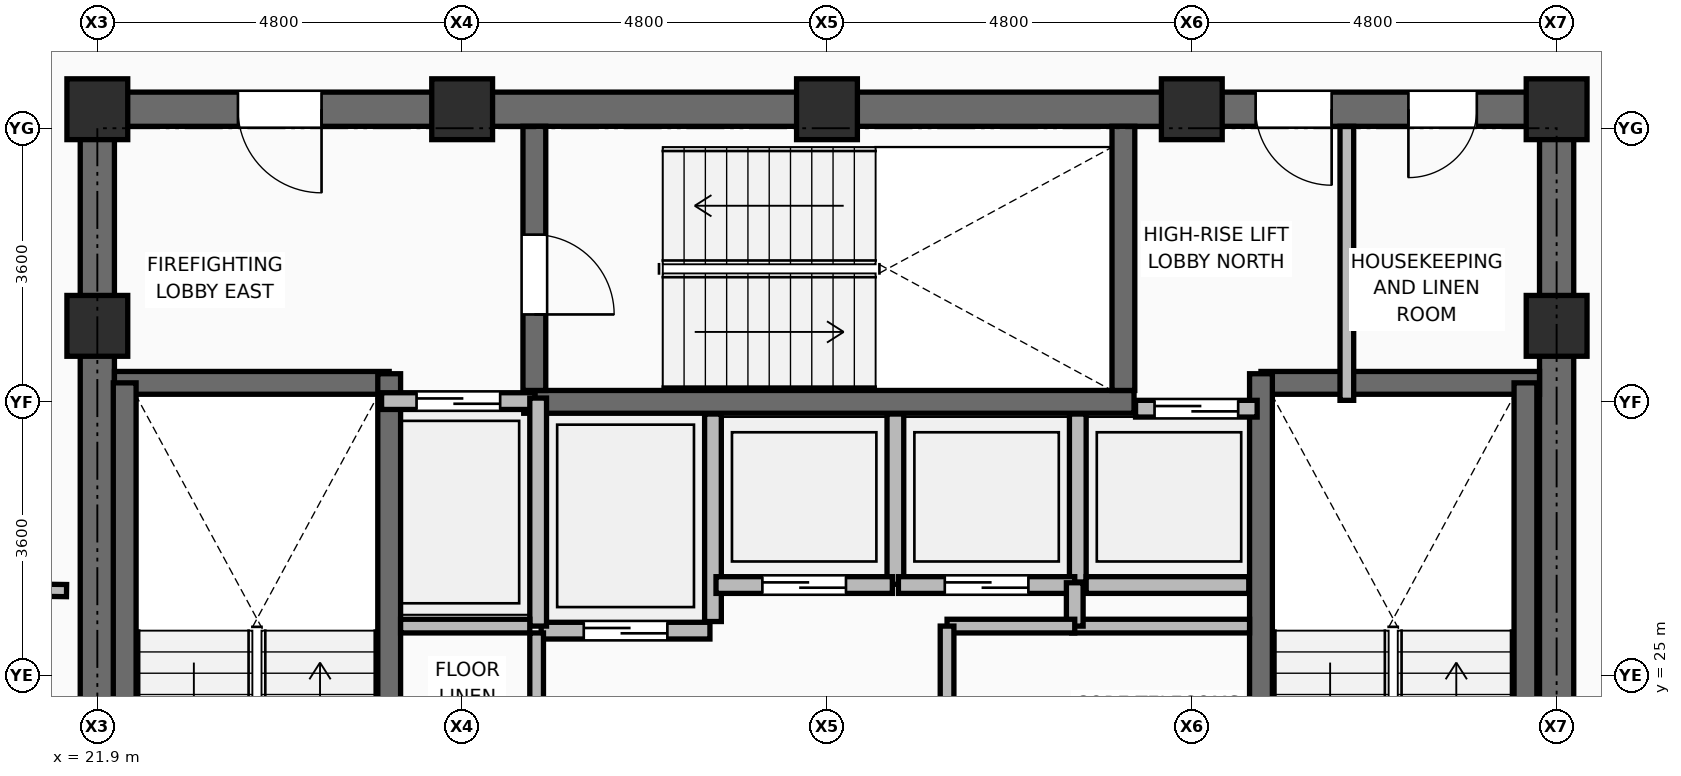
"""IFC4 building model, lengths in metres.
Left out: names, types, materials, properties, quantities, classifications, styles, units other than length and angle.
Written with IfcOpenShell. Run it as: python <this file> out.ifc"""

import sys

from ifc_helpers import new_model, si_unit, direction, frame, frame_2d, origin, origin_2d, place, context, subcontext, project, spatial, rectangle, extrude, element, fill, save


model = new_model("IFC4")
c1 = context("Model", 3, precision=1e-05, world=origin(), true_north=direction((0.0, 1.0)))
c2 = subcontext(c1, "Body", "Model", "MODEL_VIEW")
j1 = project(units=[si_unit("LENGTHUNIT", "METRE"), si_unit("PLANEANGLEUNIT", "RADIAN")], contexts=[c1])
p1 = place(None, origin())
s1 = spatial("IfcSite", under=j1, at=p1, CompositionType="ELEMENT")
p2 = place(p1, origin())
s2 = spatial("IfcBuilding", under=s1, at=p2, CompositionType="ELEMENT")
p3 = place(p2, frame((0.0, 0.0, 242.4)))
s3 = spatial("IfcBuildingStorey", under=s2, at=p3, CompositionType="ELEMENT", Elevation=242.4)
for number, where, z_axis, x_axis in (
    (1, (21.9, 29.6, 0.0), (0.0, 0.0, 1.0), (1.0, 0.0, 0.0)),
    (2, (41.1, 29.6, 0.0), (0.0, 0.0, 1.0), (1.0, 0.0, 0.0)),
    (3, (21.9, 32.45, 0.0), (0.0, 0.0, 1.0), (1.0, 0.0, 0.0)),
    (4, (26.7, 32.45, 0.0), (0.0, 0.0, 1.0), (1.0, 0.0, 0.0)),
    (5, (31.5, 32.45, 0.0), (0.0, 0.0, 1.0), (1.0, 0.0, 0.0)),
    (6, (36.3, 32.45, 0.0), (0.0, 0.0, 1.0), (1.0, 0.0, 0.0)),
    (7, (41.1, 32.45, 0.0), (0.0, 0.0, 1.0), (1.0, 0.0, 0.0)),
):
    element("IfcColumn", number, at=place(p3, frame(where, z_axis=z_axis, x_axis=x_axis)), inside=s3, PredefinedType="COLUMN", context=c2, shape_type="SweptSolid", body=[
        extrude(rectangle(XDim=0.8, YDim=0.8, at=origin_2d()), origin(), (0.0, 0.0, 1.0), 3.75),
    ])
p4 = place(p3, frame((30.0, 25.71, 0.0), z_axis=(0.0, 0.0, 1.0), x_axis=(0.0, 1.0, 0.0)))
e8 = element("IfcWall", 8, at=p4, inside=s3, PredefinedType="PARTITIONING", context=c2, shape_type="SweptSolid", body=[
    extrude(rectangle(XDim=2.73, YDim=0.22, at=frame_2d((1.365, 0.0))), origin(), (0.0, 0.0, 1.0), 3.545),
])
p5 = place(p3, frame((32.4, 26.2, 0.0), z_axis=(0.0, 0.0, 1.0), x_axis=(0.0, 1.0, 0.0)))
e9 = element("IfcWall", 9, at=p5, inside=s3, PredefinedType="PARTITIONING", context=c2, shape_type="SweptSolid", body=[
    extrude(rectangle(XDim=2.24, YDim=0.22, at=frame_2d((1.12, 0.0))), origin(), (0.0, 0.0, 1.0), 3.545),
])
p6 = place(p3, frame((34.8, 26.23, 0.0), z_axis=(0.0, 0.0, 1.0), x_axis=(0.0, 1.0, 0.0)))
e10 = element("IfcWall", 10, at=p6, inside=s3, PredefinedType="PARTITIONING", context=c2, shape_type="SweptSolid", body=[
    extrude(rectangle(XDim=2.21, YDim=0.22, at=frame_2d((1.105, 0.0))), origin(), (0.0, 0.0, 1.0), 3.545),
])
p7 = place(p3, frame((34.91, 26.19, 0.0), z_axis=(0.0, 0.0, 1.0), x_axis=(1.0, 0.0, 0.0)))
e11 = element("IfcWall", 11, at=p7, inside=s3, PredefinedType="PARTITIONING", context=c2, shape_type="SweptSolid", body=[
    extrude(rectangle(XDim=2.14, YDim=0.22, at=frame_2d((1.07, 0.0))), origin(), (0.0, 0.0, 1.0), 3.545),
])
p8 = place(p3, frame((21.675, 32.45, 0.0), z_axis=(0.0, 0.0, 1.0), x_axis=(1.0, 0.0, 0.0)))
e12 = element("IfcWall", 12, at=p8, inside=s3, PredefinedType="SHEAR", context=c2, shape_type="SweptSolid", body=[
    extrude(rectangle(XDim=19.65, YDim=0.45, at=frame_2d((9.825, 0.0))), origin(), (0.0, 0.0, 1.0), 3.57),
])
p9 = place(p8, frame((2.075, 0.0, 0.0)))
e13 = element("IfcOpeningElement", 13, at=p9, cuts=e12, PredefinedType="OPENING", context=c2, shape_type="SweptSolid", body=[
    extrude(rectangle(XDim=1.1, YDim=2.1, at=frame_2d((0.55, 1.05))), frame((0.0, 0.235, 0.0), z_axis=(0.0, -1.0, 0.0), x_axis=(1.0, 0.0, 0.0)), (0.0, 0.0, 1.0), 0.47),
])
p10 = place(p8, frame((15.465, 0.0, 0.0)))
e14 = element("IfcOpeningElement", 14, at=p10, cuts=e12, PredefinedType="OPENING", context=c2, shape_type="SweptSolid", body=[
    extrude(rectangle(XDim=1.0, YDim=2.1, at=frame_2d((0.5, 1.05))), frame((0.0, 0.235, 0.0), z_axis=(0.0, -1.0, 0.0), x_axis=(1.0, 0.0, 0.0)), (0.0, 0.0, 1.0), 0.47),
])
p11 = place(p8, frame((17.475, 0.0, 0.0)))
e15 = element("IfcOpeningElement", 15, at=p11, cuts=e12, PredefinedType="OPENING", context=c2, shape_type="SweptSolid", body=[
    extrude(rectangle(XDim=0.9, YDim=2.1, at=frame_2d((0.45, 1.05))), frame((0.0, 0.235, 0.0), z_axis=(0.0, -1.0, 0.0), x_axis=(1.0, 0.0, 0.0)), (0.0, 0.0, 1.0), 0.47),
])
p12 = place(p3, frame((21.9, 18.025, 0.0), z_axis=(0.0, 0.0, 1.0), x_axis=(0.0, 1.0, 0.0)))
e16 = element("IfcWall", 16, at=p12, inside=s3, PredefinedType="SHEAR", context=c2, shape_type="SweptSolid", body=[
    extrude(rectangle(XDim=14.2, YDim=0.45, at=frame_2d((7.1, 0.0))), origin(), (0.0, 0.0, 1.0), 3.57),
])
p13 = place(p3, frame((41.1, 18.025, 0.0), z_axis=(0.0, 0.0, 1.0), x_axis=(0.0, 1.0, 0.0)))
e17 = element("IfcWall", 17, at=p13, inside=s3, PredefinedType="SHEAR", context=c2, shape_type="SweptSolid", body=[
    extrude(rectangle(XDim=14.2, YDim=0.45, at=frame_2d((7.1, 0.0))), origin(), (0.0, 0.0, 1.0), 3.57),
])
p14 = place(p13, frame((3.435, 0.0, 0.0)))
e18 = element("IfcOpeningElement", 18, at=p14, cuts=e17, PredefinedType="OPENING", context=c2, shape_type="SweptSolid", body=[
    extrude(rectangle(XDim=1.05, YDim=2.1, at=frame_2d((0.525, 1.05))), frame((0.0, 0.235, 0.0), z_axis=(0.0, -1.0, 0.0), x_axis=(1.0, 0.0, 0.0)), (0.0, 0.0, 1.0), 0.47),
])
p15 = place(p3, frame((22.125, 28.85, 0.0), z_axis=(0.0, 0.0, 1.0), x_axis=(1.0, 0.0, 0.0)))
e19 = element("IfcWall", 19, at=p15, inside=s3, PredefinedType="SHEAR", context=c2, shape_type="SweptSolid", body=[
    extrude(rectangle(XDim=3.615, YDim=0.3, at=frame_2d((1.808, 0.0))), origin(), (0.0, 0.0, 1.0), 3.57),
])
p16 = place(p3, frame((25.74, 20.98, 0.0), z_axis=(0.0, 0.0, 1.0), x_axis=(0.0, 1.0, 0.0)))
e20 = element("IfcWall", 20, at=p16, inside=s3, PredefinedType="SHEAR", context=c2, shape_type="SweptSolid", body=[
    extrude(rectangle(XDim=7.99, YDim=0.3, at=frame_2d((3.995, 0.0))), origin(), (0.0, 0.0, 1.0), 3.57),
])
p17 = place(p3, frame((22.26, 21.1, 0.0), z_axis=(0.0, 0.0, 1.0), x_axis=(0.0, 1.0, 0.0)))
e21 = element("IfcWall", 21, at=p17, inside=s3, PredefinedType="SHEAR", context=c2, shape_type="SweptSolid", body=[
    extrude(rectangle(XDim=7.75, YDim=0.3, at=frame_2d((3.875, 0.0))), origin(), (0.0, 0.0, 1.0), 3.57),
])
p18 = place(p3, frame((37.21, 28.85, 0.0), z_axis=(0.0, 0.0, 1.0), x_axis=(1.0, 0.0, 0.0)))
e22 = element("IfcWall", 22, at=p18, inside=s3, PredefinedType="SHEAR", context=c2, shape_type="SweptSolid", body=[
    extrude(rectangle(XDim=3.665, YDim=0.3, at=frame_2d((1.833, 0.0))), origin(), (0.0, 0.0, 1.0), 3.57),
])
p19 = place(p3, frame((37.21, 20.98, 0.0), z_axis=(0.0, 0.0, 1.0), x_axis=(0.0, 1.0, 0.0)))
e23 = element("IfcWall", 23, at=p19, inside=s3, PredefinedType="SHEAR", context=c2, shape_type="SweptSolid", body=[
    extrude(rectangle(XDim=7.99, YDim=0.3, at=frame_2d((3.995, 0.0))), origin(), (0.0, 0.0, 1.0), 3.57),
])
p20 = place(p3, frame((40.69, 22.65, 0.0), z_axis=(0.0, 0.0, 1.0), x_axis=(0.0, 1.0, 0.0)))
e24 = element("IfcWall", 24, at=p20, inside=s3, PredefinedType="SHEAR", context=c2, shape_type="SweptSolid", body=[
    extrude(rectangle(XDim=6.2, YDim=0.3, at=frame_2d((3.1, 0.0))), origin(), (0.0, 0.0, 1.0), 3.57),
])
p21 = place(p3, frame((27.51, 28.6, 0.0), z_axis=(0.0, 0.0, 1.0), x_axis=(1.0, 0.0, 0.0)))
e25 = element("IfcWall", 25, at=p21, inside=s3, PredefinedType="SHEAR", context=c2, shape_type="SweptSolid", body=[
    extrude(rectangle(XDim=8.03, YDim=0.3, at=frame_2d((4.015, 0.0))), origin(), (0.0, 0.0, 1.0), 3.57),
])
p22 = place(p3, frame((27.65, 28.75, 0.0), z_axis=(0.0, 0.0, 1.0), x_axis=(0.0, 1.0, 0.0)))
e26 = element("IfcWall", 26, at=p22, inside=s3, PredefinedType="SHEAR", context=c2, shape_type="SweptSolid", body=[
    extrude(rectangle(XDim=3.475, YDim=0.3, at=frame_2d((1.738, 0.0))), origin(), (0.0, 0.0, 1.0), 3.57),
])
p23 = place(p22, frame((1.0, 0.0, 0.0)))
e27 = element("IfcOpeningElement", 27, at=p23, cuts=e26, PredefinedType="OPENING", context=c2, shape_type="SweptSolid", body=[
    extrude(rectangle(XDim=1.05, YDim=2.1, at=frame_2d((0.525, 1.05))), frame((0.0, 0.16, 0.0), z_axis=(0.0, -1.0, 0.0), x_axis=(1.0, 0.0, 0.0)), (0.0, 0.0, 1.0), 0.32),
])
p24 = place(p3, frame((35.4, 28.75, 0.0), z_axis=(0.0, 0.0, 1.0), x_axis=(0.0, 1.0, 0.0)))
e28 = element("IfcWall", 28, at=p24, inside=s3, PredefinedType="SHEAR", context=c2, shape_type="SweptSolid", body=[
    extrude(rectangle(XDim=3.475, YDim=0.3, at=frame_2d((1.738, 0.0))), origin(), (0.0, 0.0, 1.0), 3.57),
])
p25 = place(p3, frame((25.64, 28.61, 0.0), z_axis=(0.0, 0.0, 1.0), x_axis=(1.0, 0.0, 0.0)))
e29 = element("IfcWall", 29, at=p25, inside=s3, PredefinedType="PARTITIONING", context=c2, shape_type="SweptSolid", body=[
    extrude(rectangle(XDim=2.02, YDim=0.22, at=frame_2d((1.01, 0.0))), origin(), (0.0, 0.0, 1.0), 3.55),
])
p26 = place(p25, frame((0.46, 0.0, 0.0)))
e30 = element("IfcOpeningElement", 30, at=p26, cuts=e29, PredefinedType="OPENING", context=c2, shape_type="SweptSolid", body=[
    extrude(rectangle(XDim=1.1, YDim=2.2, at=frame_2d((0.55, 1.1))), frame((0.0, 0.12, 0.0), z_axis=(0.0, -1.0, 0.0), x_axis=(1.0, 0.0, 0.0)), (0.0, 0.0, 1.0), 0.24),
])
p27 = place(p3, frame((27.74, 25.59, 0.0), z_axis=(0.0, 0.0, 1.0), x_axis=(1.0, 0.0, 0.0)))
e31 = element("IfcWall", 31, at=p27, inside=s3, PredefinedType="PARTITIONING", context=c2, shape_type="SweptSolid", body=[
    extrude(rectangle(XDim=2.22, YDim=0.22, at=frame_2d((1.11, 0.0))), origin(), (0.0, 0.0, 1.0), 3.55),
])
p28 = place(p27, frame((0.56, 0.0, 0.0)))
e32 = element("IfcOpeningElement", 32, at=p28, cuts=e31, PredefinedType="OPENING", context=c2, shape_type="SweptSolid", body=[
    extrude(rectangle(XDim=1.1, YDim=2.2, at=frame_2d((0.55, 1.1))), frame((0.0, 0.12, 0.0), z_axis=(0.0, -1.0, 0.0), x_axis=(1.0, 0.0, 0.0)), (0.0, 0.0, 1.0), 0.24),
])
p29 = place(p3, frame((30.04, 26.19, 0.0), z_axis=(0.0, 0.0, 1.0), x_axis=(1.0, 0.0, 0.0)))
e33 = element("IfcWall", 33, at=p29, inside=s3, PredefinedType="PARTITIONING", context=c2, shape_type="SweptSolid", body=[
    extrude(rectangle(XDim=2.32, YDim=0.22, at=frame_2d((1.16, 0.0))), origin(), (0.0, 0.0, 1.0), 3.55),
])
p30 = place(p29, frame((0.61, 0.0, 0.0)))
e34 = element("IfcOpeningElement", 34, at=p30, cuts=e33, PredefinedType="OPENING", context=c2, shape_type="SweptSolid", body=[
    extrude(rectangle(XDim=1.1, YDim=2.2, at=frame_2d((0.55, 1.1))), frame((0.0, 0.12, 0.0), z_axis=(0.0, -1.0, 0.0), x_axis=(1.0, 0.0, 0.0)), (0.0, 0.0, 1.0), 0.24),
])
p31 = place(p3, frame((32.44, 26.19, 0.0), z_axis=(0.0, 0.0, 1.0), x_axis=(1.0, 0.0, 0.0)))
e35 = element("IfcWall", 35, at=p31, inside=s3, PredefinedType="PARTITIONING", context=c2, shape_type="SweptSolid", body=[
    extrude(rectangle(XDim=2.32, YDim=0.22, at=frame_2d((1.16, 0.0))), origin(), (0.0, 0.0, 1.0), 3.55),
])
p32 = place(p31, frame((0.61, 0.0, 0.0)))
e36 = element("IfcOpeningElement", 36, at=p32, cuts=e35, PredefinedType="OPENING", context=c2, shape_type="SweptSolid", body=[
    extrude(rectangle(XDim=1.1, YDim=2.2, at=frame_2d((0.55, 1.1))), frame((0.0, 0.12, 0.0), z_axis=(0.0, -1.0, 0.0), x_axis=(1.0, 0.0, 0.0)), (0.0, 0.0, 1.0), 0.24),
])
p33 = place(p3, frame((35.56, 28.51, 0.0), z_axis=(0.0, 0.0, 1.0), x_axis=(1.0, 0.0, 0.0)))
e37 = element("IfcWall", 37, at=p33, inside=s3, PredefinedType="PARTITIONING", context=c2, shape_type="SweptSolid", body=[
    extrude(rectangle(XDim=1.6, YDim=0.22, at=frame_2d((0.8, 0.0))), origin(), (0.0, 0.0, 1.0), 3.55),
])
p34 = place(p33, frame((0.25, 0.0, 0.0)))
e38 = element("IfcOpeningElement", 38, at=p34, cuts=e37, PredefinedType="OPENING", context=c2, shape_type="SweptSolid", body=[
    extrude(rectangle(XDim=1.1, YDim=2.2, at=frame_2d((0.55, 1.1))), frame((0.0, 0.12, 0.0), z_axis=(0.0, -1.0, 0.0), x_axis=(1.0, 0.0, 0.0)), (0.0, 0.0, 1.0), 0.24),
])
p35 = place(p3, frame((27.7, 25.65, 0.0), z_axis=(0.0, 0.0, 1.0), x_axis=(0.0, 1.0, 0.0)))
e39 = element("IfcWall", 39, at=p35, inside=s3, PredefinedType="PARTITIONING", context=c2, shape_type="SweptSolid", body=[
    extrude(rectangle(XDim=3.0, YDim=0.22, at=frame_2d((1.5, 0.0))), origin(), (0.0, 0.0, 1.0), 3.55),
])
p36 = place(p3, frame((25.89, 25.65, 0.0), z_axis=(0.0, 0.0, 1.0), x_axis=(1.0, 0.0, 0.0)))
e40 = element("IfcWall", 40, at=p36, inside=s3, PredefinedType="PARTITIONING", context=c2, shape_type="SweptSolid", body=[
    extrude(rectangle(XDim=1.7, YDim=0.18, at=frame_2d((0.85, 0.0))), origin(), (0.0, 0.0, 1.0), 3.55),
])
p37 = place(p3, frame((27.68, 24.2, 0.0), z_axis=(0.0, 0.0, 1.0), x_axis=(0.0, 1.0, 0.0)))
e41 = element("IfcWall", 41, at=p37, inside=s3, PredefinedType="PARTITIONING", context=c2, shape_type="SweptSolid", body=[
    extrude(rectangle(XDim=1.36, YDim=0.18, at=frame_2d((0.68, 0.0))), origin(), (0.0, 0.0, 1.0), 3.55),
])
p38 = place(p3, frame((34.72, 25.65, 0.0), z_axis=(0.0, 0.0, 1.0), x_axis=(1.0, 0.0, 0.0)))
e42 = element("IfcWall", 42, at=p38, inside=s3, PredefinedType="PARTITIONING", context=c2, shape_type="SweptSolid", body=[
    extrude(rectangle(XDim=2.34, YDim=0.18, at=frame_2d((1.17, 0.0))), origin(), (0.0, 0.0, 1.0), 3.55),
])
p39 = place(p3, frame((34.76, 25.65, 0.0), z_axis=(0.0, 0.0, 1.0), x_axis=(0.0, 1.0, 0.0)))
e43 = element("IfcWall", 43, at=p39, inside=s3, PredefinedType="PARTITIONING", context=c2, shape_type="SweptSolid", body=[
    extrude(rectangle(XDim=0.57, YDim=0.22, at=frame_2d((0.285, 0.0))), origin(), (0.0, 0.0, 1.0), 3.55),
])
p40 = place(p3, frame((33.08, 25.65, 0.0), z_axis=(0.0, 0.0, 1.0), x_axis=(1.0, 0.0, 0.0)))
e44 = element("IfcWall", 44, at=p40, inside=s3, PredefinedType="PARTITIONING", context=c2, shape_type="SweptSolid", body=[
    extrude(rectangle(XDim=1.68, YDim=0.18, at=frame_2d((0.84, 0.0))), origin(), (0.0, 0.0, 1.0), 3.55),
])
p41 = place(p3, frame((33.08, 23.48, 0.0), z_axis=(0.0, 0.0, 1.0), x_axis=(0.0, 1.0, 0.0)))
e45 = element("IfcWall", 45, at=p41, inside=s3, PredefinedType="PARTITIONING", context=c2, shape_type="SweptSolid", body=[
    extrude(rectangle(XDim=2.17, YDim=0.18, at=frame_2d((1.085, 0.0))), origin(), (0.0, 0.0, 1.0), 3.55),
])
p42 = place(p3, frame((38.34, 28.62, 0.0), z_axis=(0.0, 0.0, 1.0), x_axis=(0.0, 1.0, 0.0)))
e46 = element("IfcWall", 46, at=p42, inside=s3, PredefinedType="PARTITIONING", context=c2, shape_type="SweptSolid", body=[
    extrude(rectangle(XDim=3.605, YDim=0.18, at=frame_2d((1.802, 0.0))), origin(), (0.0, 0.0, 1.0), 3.55),
])
p43 = place(p3, frame((21.495, 26.117, 0.0), z_axis=(0.0, 0.0, 1.0), x_axis=(-0.999908537082, 0.013524698532, 0.0)))
e47 = element("IfcWall", 47, at=p43, inside=s3, PredefinedType="PARTITIONING", context=c2, shape_type="SweptSolid", body=[
    extrude(rectangle(XDim=1.859, YDim=0.16, at=frame_2d((0.93, 0.0))), origin(), (0.0, 0.0, 1.0), 2.595),
])
p44 = place(p23, frame((1.05, 0.0, 0.0), z_axis=(0.0, 0.0, 1.0), x_axis=(-1.0, 0.0, 0.0)))
e48 = element("IfcDoor", 48, at=p44, inside=s3, OperationType="SINGLE_SWING_RIGHT", PredefinedType="DOOR", context=c2, shape_type="SweptSolid", body=[
    extrude(rectangle(XDim=1.05, YDim=2.1, at=frame_2d((0.525, 1.05))), frame((0.0, 0.025, 0.0), z_axis=(0.0, -1.0, 0.0), x_axis=(1.0, 0.0, 0.0)), (0.0, 0.0, 1.0), 0.05),
])
fill(e27, e48)
p45 = place(p26, origin())
e49 = element("IfcDoor", 49, at=p45, inside=s3, OperationType="DOUBLE_DOOR_SLIDING", PredefinedType="DOOR", context=c2, shape_type="SweptSolid", body=[
    extrude(rectangle(XDim=1.1, YDim=2.2, at=frame_2d((0.55, 1.1))), frame((0.0, 0.025, 0.0), z_axis=(0.0, -1.0, 0.0), x_axis=(1.0, 0.0, 0.0)), (0.0, 0.0, 1.0), 0.05),
])
fill(e30, e49)
p46 = place(p28, frame((1.1, 0.0, 0.0), z_axis=(0.0, 0.0, 1.0), x_axis=(-1.0, 0.0, 0.0)))
e50 = element("IfcDoor", 50, at=p46, inside=s3, OperationType="DOUBLE_DOOR_SLIDING", PredefinedType="DOOR", context=c2, shape_type="SweptSolid", body=[
    extrude(rectangle(XDim=1.1, YDim=2.2, at=frame_2d((0.55, 1.1))), frame((0.0, 0.025, 0.0), z_axis=(0.0, -1.0, 0.0), x_axis=(1.0, 0.0, 0.0)), (0.0, 0.0, 1.0), 0.05),
])
fill(e32, e50)
p47 = place(p30, frame((1.1, 0.0, 0.0), z_axis=(0.0, 0.0, 1.0), x_axis=(-1.0, 0.0, 0.0)))
e51 = element("IfcDoor", 51, at=p47, inside=s3, OperationType="DOUBLE_DOOR_SLIDING", PredefinedType="DOOR", context=c2, shape_type="SweptSolid", body=[
    extrude(rectangle(XDim=1.1, YDim=2.2, at=frame_2d((0.55, 1.1))), frame((0.0, 0.025, 0.0), z_axis=(0.0, -1.0, 0.0), x_axis=(1.0, 0.0, 0.0)), (0.0, 0.0, 1.0), 0.05),
])
fill(e34, e51)
p48 = place(p32, frame((1.1, 0.0, 0.0), z_axis=(0.0, 0.0, 1.0), x_axis=(-1.0, 0.0, 0.0)))
e52 = element("IfcDoor", 52, at=p48, inside=s3, OperationType="DOUBLE_DOOR_SLIDING", PredefinedType="DOOR", context=c2, shape_type="SweptSolid", body=[
    extrude(rectangle(XDim=1.1, YDim=2.2, at=frame_2d((0.55, 1.1))), frame((0.0, 0.025, 0.0), z_axis=(0.0, -1.0, 0.0), x_axis=(1.0, 0.0, 0.0)), (0.0, 0.0, 1.0), 0.05),
])
fill(e36, e52)
p49 = place(p34, origin())
e53 = element("IfcDoor", 53, at=p49, inside=s3, OperationType="DOUBLE_DOOR_SLIDING", PredefinedType="DOOR", context=c2, shape_type="SweptSolid", body=[
    extrude(rectangle(XDim=1.1, YDim=2.2, at=frame_2d((0.55, 1.1))), frame((0.0, 0.025, 0.0), z_axis=(0.0, -1.0, 0.0), x_axis=(1.0, 0.0, 0.0)), (0.0, 0.0, 1.0), 0.05),
])
fill(e38, e53)
p50 = place(p9, frame((1.1, 0.0, 0.0), z_axis=(0.0, 0.0, 1.0), x_axis=(-1.0, 0.0, 0.0)))
e54 = element("IfcDoor", 54, at=p50, inside=s3, OperationType="SINGLE_SWING_LEFT", PredefinedType="DOOR", context=c2, shape_type="SweptSolid", body=[
    extrude(rectangle(XDim=1.1, YDim=2.1, at=frame_2d((0.55, 1.05))), frame((0.0, 0.025, 0.0), z_axis=(0.0, -1.0, 0.0), x_axis=(1.0, 0.0, 0.0)), (0.0, 0.0, 1.0), 0.05),
])
fill(e13, e54)
p51 = place(p10, frame((1.0, 0.0, 0.0), z_axis=(0.0, 0.0, 1.0), x_axis=(-1.0, 0.0, 0.0)))
e55 = element("IfcDoor", 55, at=p51, inside=s3, OperationType="SINGLE_SWING_LEFT", PredefinedType="DOOR", context=c2, shape_type="SweptSolid", body=[
    extrude(rectangle(XDim=1.0, YDim=2.1, at=frame_2d((0.5, 1.05))), frame((0.0, 0.025, 0.0), z_axis=(0.0, -1.0, 0.0), x_axis=(1.0, 0.0, 0.0)), (0.0, 0.0, 1.0), 0.05),
])
fill(e14, e55)
p52 = place(p11, frame((0.9, 0.0, 0.0), z_axis=(0.0, 0.0, 1.0), x_axis=(-1.0, 0.0, 0.0)))
e56 = element("IfcDoor", 56, at=p52, inside=s3, OperationType="SINGLE_SWING_RIGHT", PredefinedType="DOOR", context=c2, shape_type="SweptSolid", body=[
    extrude(rectangle(XDim=0.9, YDim=2.1, at=frame_2d((0.45, 1.05))), frame((0.0, 0.025, 0.0), z_axis=(0.0, -1.0, 0.0), x_axis=(1.0, 0.0, 0.0)), (0.0, 0.0, 1.0), 0.05),
])
fill(e15, e56)
save(model, sys.argv[1])
